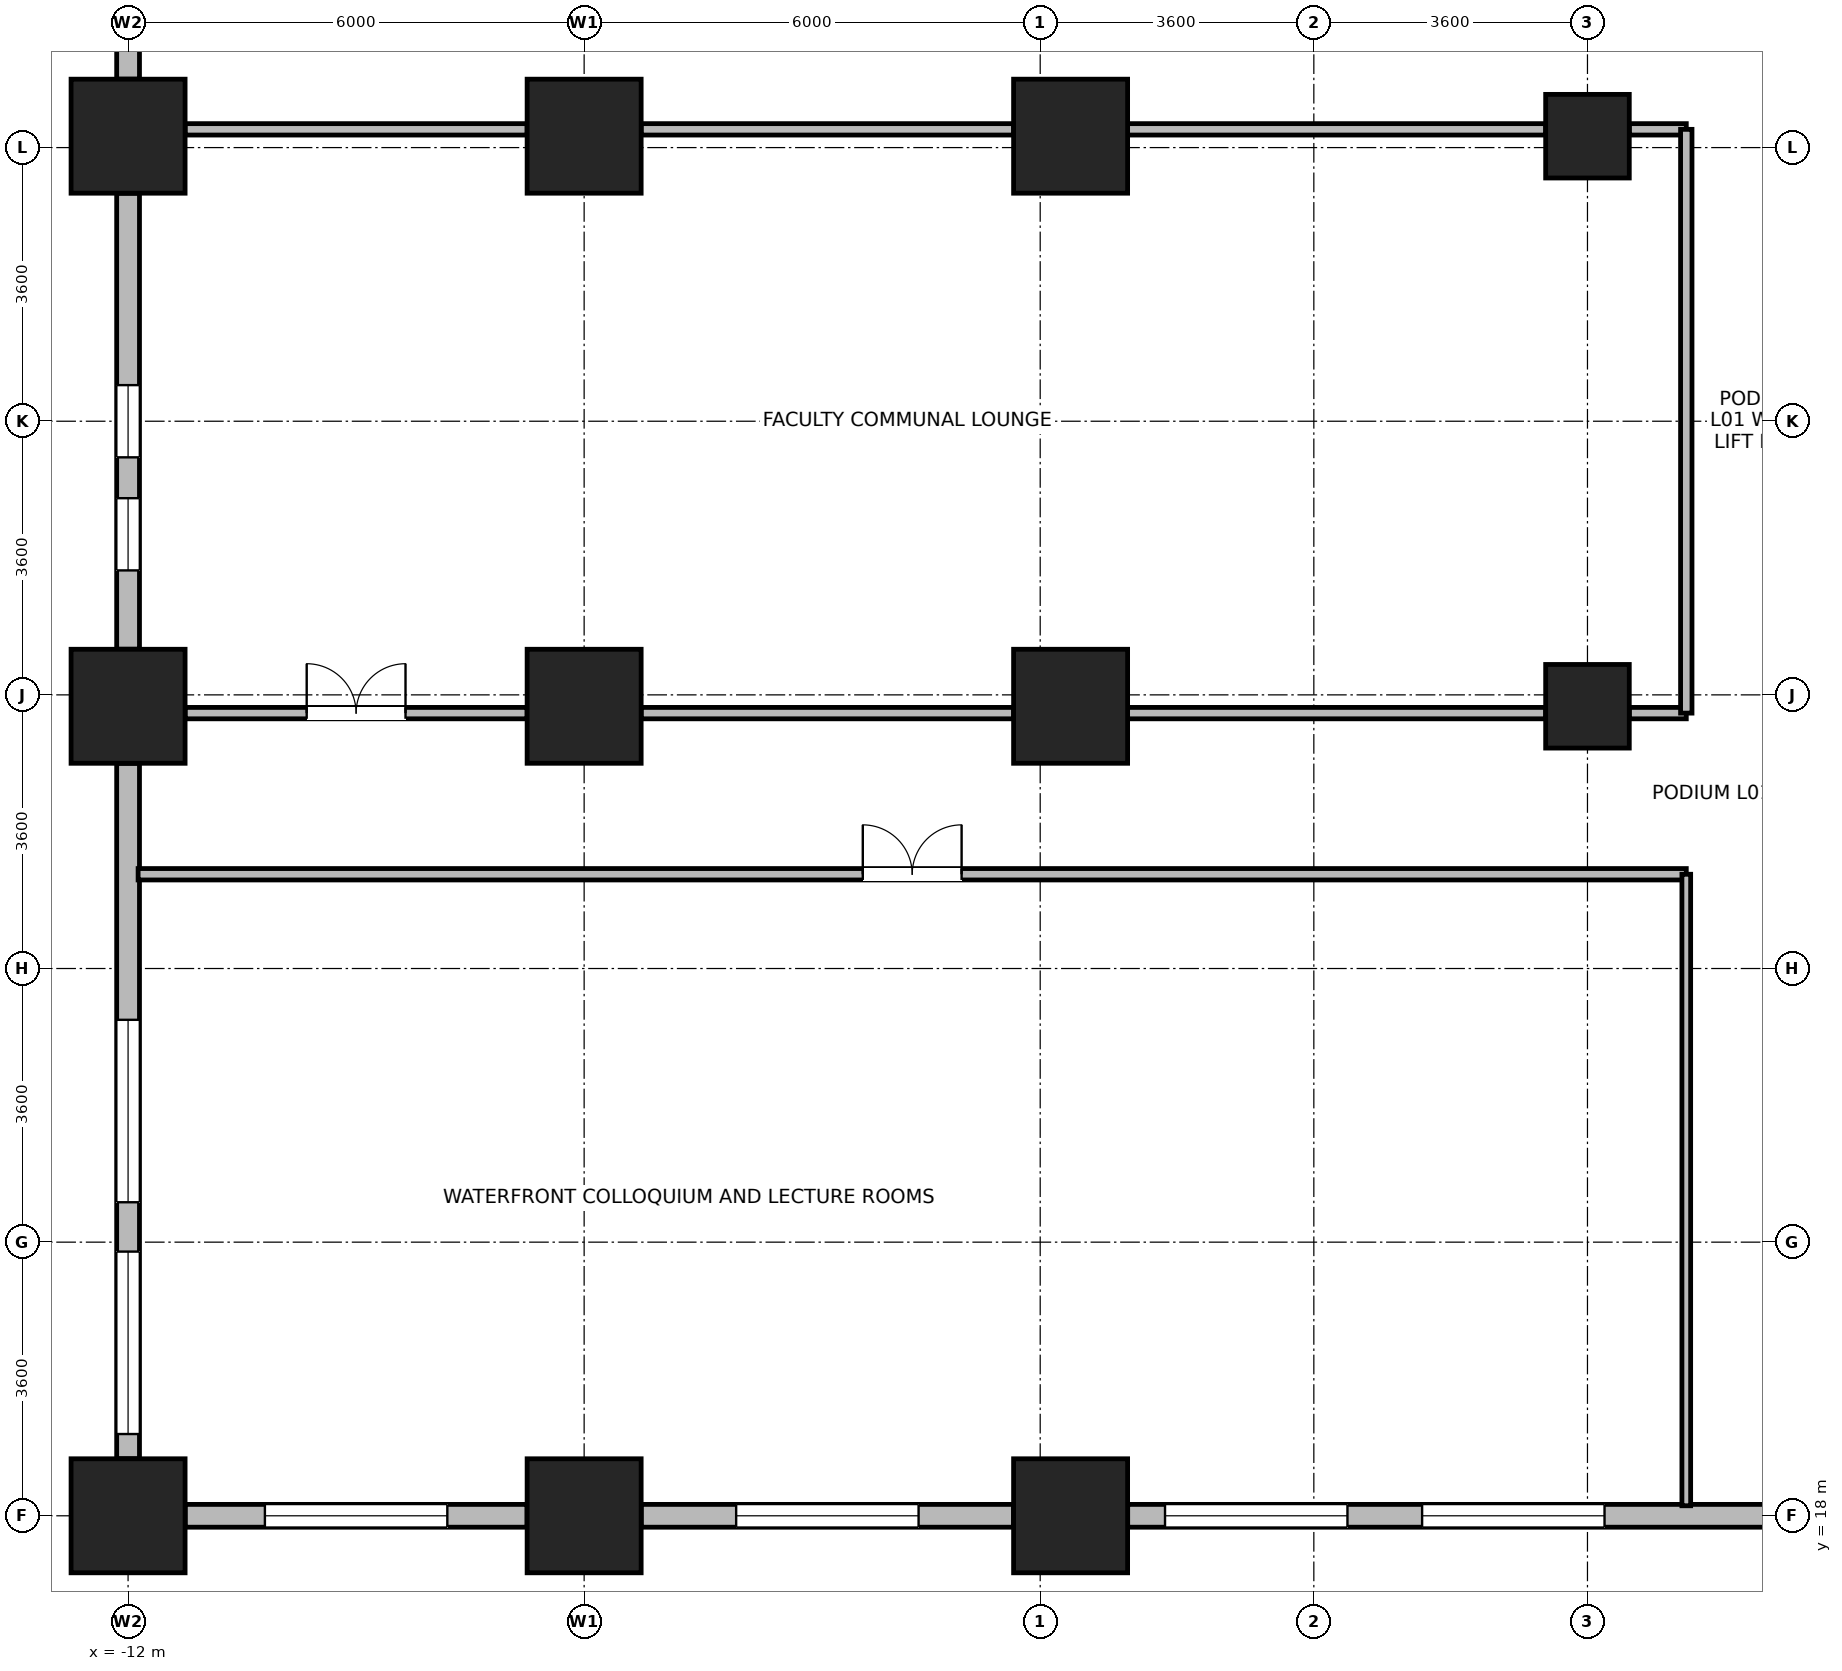
"""IFC4 building model, lengths in metres.
Left out: names, types, materials, properties, quantities, classifications, styles, units other than length and angle.
Written with IfcOpenShell. Run it as: python <this file> out.ifc"""

import sys

from ifc_helpers import new_model, si_unit, direction, frame, frame_2d, origin, origin_2d, place, context, subcontext, project, spatial, rectangle, circle, extrude, source, transform, mapped, element, fill, save


model = new_model("IFC4")
c1 = context("Model", 3, precision=1e-05, world=origin(), true_north=direction((0.0, 1.0)))
c2 = subcontext(c1, "Body", "Model", "MODEL_VIEW")
j1 = project(units=[si_unit("LENGTHUNIT", "METRE"), si_unit("PLANEANGLEUNIT", "RADIAN")], contexts=[c1])
p1 = place(None, origin())
s1 = spatial("IfcSite", under=j1, at=p1, CompositionType="ELEMENT")
p2 = place(p1, origin())
s2 = spatial("IfcBuilding", under=s1, at=p2, CompositionType="ELEMENT")
p3 = place(p2, frame((0.0, 0.0, 5.4)))
s3 = spatial("IfcBuildingStorey", under=s2, at=p3, CompositionType="ELEMENT", Elevation=5.4)
m1 = source(origin(), c2, "Body", "SweptSolid", [
    extrude(circle(Radius=0.55, at=origin_2d()), origin(), (0.0, 0.0, 1.0), 4.8),
])
for number, where, z_axis, x_axis in (
    (1, (7.2, 28.65, 0.0), (0.0, 0.0, 1.0), (1.0, 0.0, 0.0)),
    (2, (7.2, 36.15, 0.0), (0.0, 0.0, 1.0), (1.0, 0.0, 0.0)),
):
    element("IfcColumn", number, at=place(p3, frame(where, z_axis=z_axis, x_axis=x_axis)), inside=s3, PredefinedType="COLUMN", context=c2, shape_type="MappedRepresentation", body=[
        mapped(m1, transform((0.0, 0.0, 0.0), x_axis=(1.0, 0.0, 0.0), y_axis=(0.0, 1.0, 0.0), z_axis=(0.0, 0.0, 1.0), scale=1.0)),
    ])
m2 = source(origin(), c2, "Body", "SweptSolid", [
    extrude(rectangle(XDim=1.5, YDim=1.5, at=origin_2d()), origin(), (0.0, 0.0, 1.0), 4.8),
])
for number, where, z_axis, x_axis in (
    (3, (0.4, 18.0, 0.0), (0.0, 0.0, 1.0), (1.0, 0.0, 0.0)),
    (4, (0.4, 28.65, 0.0), (0.0, 0.0, 1.0), (1.0, 0.0, 0.0)),
    (5, (0.4, 36.15, 0.0), (0.0, 0.0, 1.0), (1.0, 0.0, 0.0)),
    (6, (-12.0, 18.0, 0.0), (0.0, 0.0, 1.0), (1.0, 0.0, 0.0)),
    (7, (-12.0, 28.65, 0.0), (0.0, 0.0, 1.0), (1.0, 0.0, 0.0)),
    (8, (-12.0, 36.15, 0.0), (0.0, 0.0, 1.0), (1.0, 0.0, 0.0)),
    (9, (-6.0, 18.0, 0.0), (0.0, 0.0, 1.0), (1.0, 0.0, 0.0)),
    (10, (-6.0, 28.65, 0.0), (0.0, 0.0, 1.0), (1.0, 0.0, 0.0)),
    (11, (-6.0, 36.15, 0.0), (0.0, 0.0, 1.0), (1.0, 0.0, 0.0)),
):
    element("IfcColumn", number, at=place(p3, frame(where, z_axis=z_axis, x_axis=x_axis)), inside=s3, PredefinedType="COLUMN", context=c2, shape_type="MappedRepresentation", body=[
        mapped(m2, transform((0.0, 0.0, 0.0), x_axis=(1.0, 0.0, 0.0), y_axis=(0.0, 1.0, 0.0), z_axis=(0.0, 0.0, 1.0), scale=1.0)),
    ])
p4 = place(p3, frame((-12.0, 36.901, 0.0), z_axis=(0.0, 0.0, 1.0), x_axis=(0.0, 1.0, 0.0)))
e12 = element("IfcWall", 12, at=p4, inside=s3, PredefinedType="STANDARD", context=c2, shape_type="SweptSolid", body=[
    extrude(rectangle(XDim=7.198, YDim=0.3, at=frame_2d((3.599, 0.0))), origin(), (0.0, 0.0, 1.0), 3.9),
])
p5 = place(p4, frame((4.198, 0.0, 0.9)))
e13 = element("IfcOpeningElement", 13, at=p5, cuts=e12, PredefinedType="OPENING", context=c2, shape_type="SweptSolid", body=[
    extrude(rectangle(XDim=2.4, YDim=2.5, at=frame_2d((1.2, 1.25))), frame((0.0, 0.16, 0.0), z_axis=(0.0, -1.0, 0.0), x_axis=(1.0, 0.0, 0.0)), (0.0, 0.0, 1.0), 0.32),
])
p6 = place(p4, frame((2.548, 0.0, 0.9)))
e14 = element("IfcOpeningElement", 14, at=p6, cuts=e12, PredefinedType="OPENING", context=c2, shape_type="SweptSolid", body=[
    extrude(rectangle(XDim=0.95, YDim=1.75, at=frame_2d((0.475, 0.875))), frame((0.0, 0.16, 0.0), z_axis=(0.0, -1.0, 0.0), x_axis=(1.0, 0.0, 0.0)), (0.0, 0.0, 1.0), 0.32),
])
p7 = place(p3, frame((-12.0, 29.401, 0.0), z_axis=(0.0, 0.0, 1.0), x_axis=(0.0, 1.0, 0.0)))
e15 = element("IfcWall", 15, at=p7, inside=s3, PredefinedType="STANDARD", context=c2, shape_type="SweptSolid", body=[
    extrude(rectangle(XDim=5.998, YDim=0.3, at=frame_2d((2.999, 0.0))), origin(), (0.0, 0.0, 1.0), 3.9),
])
p8 = place(p7, frame((2.524, 0.0, 0.9)))
e16 = element("IfcOpeningElement", 16, at=p8, cuts=e15, PredefinedType="OPENING", context=c2, shape_type="SweptSolid", body=[
    extrude(rectangle(XDim=0.95, YDim=1.75, at=frame_2d((0.475, 0.875))), frame((0.0, 0.16, 0.0), z_axis=(0.0, -1.0, 0.0), x_axis=(1.0, 0.0, 0.0)), (0.0, 0.0, 1.0), 0.32),
])
p9 = place(p7, frame((1.037, 0.0, 0.9)))
e17 = element("IfcOpeningElement", 17, at=p9, cuts=e15, PredefinedType="OPENING", context=c2, shape_type="SweptSolid", body=[
    extrude(rectangle(XDim=0.95, YDim=1.75, at=frame_2d((0.475, 0.875))), frame((0.0, 0.16, 0.0), z_axis=(0.0, -1.0, 0.0), x_axis=(1.0, 0.0, 0.0)), (0.0, 0.0, 1.0), 0.32),
])
p10 = place(p3, frame((-12.0, 18.751, 0.0), z_axis=(0.0, 0.0, 1.0), x_axis=(0.0, 1.0, 0.0)))
e18 = element("IfcWall", 18, at=p10, inside=s3, PredefinedType="STANDARD", context=c2, shape_type="SweptSolid", body=[
    extrude(rectangle(XDim=9.148, YDim=0.3, at=frame_2d((4.574, 0.0))), origin(), (0.0, 0.0, 1.0), 3.9),
])
p11 = place(p10, frame((0.325, 0.0, 0.9)))
e19 = element("IfcOpeningElement", 19, at=p11, cuts=e18, PredefinedType="OPENING", context=c2, shape_type="SweptSolid", body=[
    extrude(rectangle(XDim=2.4, YDim=2.5, at=frame_2d((1.2, 1.25))), frame((0.0, 0.16, 0.0), z_axis=(0.0, -1.0, 0.0), x_axis=(1.0, 0.0, 0.0)), (0.0, 0.0, 1.0), 0.32),
])
p12 = place(p10, frame((3.374, 0.0, 0.9)))
e20 = element("IfcOpeningElement", 20, at=p12, cuts=e18, PredefinedType="OPENING", context=c2, shape_type="SweptSolid", body=[
    extrude(rectangle(XDim=2.4, YDim=2.5, at=frame_2d((1.2, 1.25))), frame((0.0, 0.16, 0.0), z_axis=(0.0, -1.0, 0.0), x_axis=(1.0, 0.0, 0.0)), (0.0, 0.0, 1.0), 0.32),
])
p13 = place(p3, frame((-6.751, 18.0, 0.0), z_axis=(0.0, 0.0, 1.0), x_axis=(-1.0, 0.0, 0.0)))
e21 = element("IfcWall", 21, at=p13, inside=s3, PredefinedType="STANDARD", context=c2, shape_type="SweptSolid", body=[
    extrude(rectangle(XDim=4.498, YDim=0.3, at=frame_2d((2.249, 0.0))), origin(), (0.0, 0.0, 1.0), 3.8),
])
p14 = place(p13, frame((1.049, 0.0, 0.9)))
e22 = element("IfcOpeningElement", 22, at=p14, cuts=e21, PredefinedType="OPENING", context=c2, shape_type="SweptSolid", body=[
    extrude(rectangle(XDim=2.4, YDim=2.5, at=frame_2d((1.2, 1.25))), frame((0.0, 0.16, 0.0), z_axis=(0.0, -1.0, 0.0), x_axis=(1.0, 0.0, 0.0)), (0.0, 0.0, 1.0), 0.32),
])
p15 = place(p3, frame((-0.351, 18.0, 0.0), z_axis=(0.0, 0.0, 1.0), x_axis=(-1.0, 0.0, 0.0)))
e23 = element("IfcWall", 23, at=p15, inside=s3, PredefinedType="STANDARD", context=c2, shape_type="SweptSolid", body=[
    extrude(rectangle(XDim=4.898, YDim=0.3, at=frame_2d((2.449, 0.0))), origin(), (0.0, 0.0, 1.0), 3.8),
])
p16 = place(p15, frame((1.249, 0.0, 0.9)))
e24 = element("IfcOpeningElement", 24, at=p16, cuts=e23, PredefinedType="OPENING", context=c2, shape_type="SweptSolid", body=[
    extrude(rectangle(XDim=2.4, YDim=2.5, at=frame_2d((1.2, 1.25))), frame((0.0, 0.16, 0.0), z_axis=(0.0, -1.0, 0.0), x_axis=(1.0, 0.0, 0.0)), (0.0, 0.0, 1.0), 0.32),
])
p17 = place(p3, frame((21.445, 18.0, 0.0), z_axis=(0.0, 0.0, 1.0), x_axis=(-1.0, 0.0, 0.0)))
e25 = element("IfcWall", 25, at=p17, inside=s3, PredefinedType="STANDARD", context=c2, shape_type="SweptSolid", body=[
    extrude(rectangle(XDim=20.294, YDim=0.3, at=frame_2d((10.147, 0.0))), origin(), (0.0, 0.0, 1.0), 4.5),
])
p18 = place(p17, frame((0.491, 0.0, 0.9)))
e26 = element("IfcOpeningElement", 26, at=p18, cuts=e25, PredefinedType="OPENING", context=c2, shape_type="SweptSolid", body=[
    extrude(rectangle(XDim=2.4, YDim=2.5, at=frame_2d((1.2, 1.25))), frame((0.0, 0.16, 0.0), z_axis=(0.0, -1.0, 0.0), x_axis=(1.0, 0.0, 0.0)), (0.0, 0.0, 1.0), 0.32),
])
p19 = place(p17, frame((3.874, 0.0, 0.9)))
e27 = element("IfcOpeningElement", 27, at=p19, cuts=e25, PredefinedType="OPENING", context=c2, shape_type="SweptSolid", body=[
    extrude(rectangle(XDim=2.4, YDim=2.5, at=frame_2d((1.2, 1.25))), frame((0.0, 0.16, 0.0), z_axis=(0.0, -1.0, 0.0), x_axis=(1.0, 0.0, 0.0)), (0.0, 0.0, 1.0), 0.32),
])
p20 = place(p17, frame((7.256, 0.0, 0.9)))
e28 = element("IfcOpeningElement", 28, at=p20, cuts=e25, PredefinedType="OPENING", context=c2, shape_type="SweptSolid", body=[
    extrude(rectangle(XDim=2.4, YDim=2.5, at=frame_2d((1.2, 1.25))), frame((0.0, 0.16, 0.0), z_axis=(0.0, -1.0, 0.0), x_axis=(1.0, 0.0, 0.0)), (0.0, 0.0, 1.0), 0.32),
])
p21 = place(p17, frame((14.021, 0.0, 0.9)))
e29 = element("IfcOpeningElement", 29, at=p21, cuts=e25, PredefinedType="OPENING", context=c2, shape_type="SweptSolid", body=[
    extrude(rectangle(XDim=2.4, YDim=2.5, at=frame_2d((1.2, 1.25))), frame((0.0, 0.16, 0.0), z_axis=(0.0, -1.0, 0.0), x_axis=(1.0, 0.0, 0.0)), (0.0, 0.0, 1.0), 0.32),
])
p22 = place(p17, frame((17.403, 0.0, 0.9)))
e30 = element("IfcOpeningElement", 30, at=p22, cuts=e25, PredefinedType="OPENING", context=c2, shape_type="SweptSolid", body=[
    extrude(rectangle(XDim=2.4, YDim=2.5, at=frame_2d((1.2, 1.25))), frame((0.0, 0.16, 0.0), z_axis=(0.0, -1.0, 0.0), x_axis=(1.0, 0.0, 0.0)), (0.0, 0.0, 1.0), 0.32),
])
p23 = place(p3, frame((-11.868, 26.44, 0.0), z_axis=(0.0, 0.0, 1.0), x_axis=(1.0, 0.0, 0.0)))
e31 = element("IfcWall", 31, at=p23, inside=s3, PredefinedType="PARTITIONING", context=c2, shape_type="SweptSolid", body=[
    extrude(rectangle(XDim=20.368, YDim=0.15, at=frame_2d((10.184, 0.0))), origin(), (0.0, 0.0, 1.0), 4.5),
])
p24 = place(p23, frame((9.534, 0.0, 0.0)))
e32 = element("IfcOpeningElement", 32, at=p24, cuts=e31, PredefinedType="OPENING", context=c2, shape_type="SweptSolid", body=[
    extrude(rectangle(XDim=1.3, YDim=2.12, at=frame_2d((0.65, 1.06))), frame((0.0, 0.085, 0.0), z_axis=(0.0, -1.0, 0.0), x_axis=(1.0, 0.0, 0.0)), (0.0, 0.0, 1.0), 0.17),
])
p25 = place(p3, frame((-11.25, 28.56, 0.0), z_axis=(0.0, 0.0, 1.0), x_axis=(1.0, 0.0, 0.0)))
e33 = element("IfcWall", 33, at=p25, inside=s3, PredefinedType="PARTITIONING", context=c2, shape_type="SweptSolid", body=[
    extrude(rectangle(XDim=4.5, YDim=0.15, at=frame_2d((2.25, 0.0))), origin(), (0.0, 0.0, 1.0), 3.8),
])
p26 = place(p25, frame((1.6, 0.0, 0.0)))
e34 = element("IfcOpeningElement", 34, at=p26, cuts=e33, PredefinedType="OPENING", context=c2, shape_type="SweptSolid", body=[
    extrude(rectangle(XDim=1.3, YDim=2.12, at=frame_2d((0.65, 1.06))), frame((0.0, 0.085, 0.0), z_axis=(0.0, -1.0, 0.0), x_axis=(1.0, 0.0, 0.0)), (0.0, 0.0, 1.0), 0.17),
])
p27 = place(p3, frame((-5.25, 28.56, 0.0), z_axis=(0.0, 0.0, 1.0), x_axis=(1.0, 0.0, 0.0)))
e35 = element("IfcWall", 35, at=p27, inside=s3, PredefinedType="PARTITIONING", context=c2, shape_type="SweptSolid", body=[
    extrude(rectangle(XDim=4.9, YDim=0.15, at=frame_2d((2.45, 0.0))), origin(), (0.0, 0.0, 1.0), 3.8),
])
p28 = place(p3, frame((1.15, 28.56, 0.0), z_axis=(0.0, 0.0, 1.0), x_axis=(1.0, 0.0, 0.0)))
e36 = element("IfcWall", 36, at=p28, inside=s3, PredefinedType="PARTITIONING", context=c2, shape_type="SweptSolid", body=[
    extrude(rectangle(XDim=5.5, YDim=0.15, at=frame_2d((2.75, 0.0))), origin(), (0.0, 0.0, 1.0), 3.8),
])
p29 = place(p3, frame((7.75, 28.56, 0.0), z_axis=(0.0, 0.0, 1.0), x_axis=(1.0, 0.0, 0.0)))
e37 = element("IfcWall", 37, at=p29, inside=s3, PredefinedType="PARTITIONING", context=c2, shape_type="SweptSolid", body=[
    extrude(rectangle(XDim=0.75, YDim=0.15, at=frame_2d((0.375, 0.0))), origin(), (0.0, 0.0, 1.0), 3.8),
])
p30 = place(p3, frame((-11.25, 36.24, 0.0), z_axis=(0.0, 0.0, 1.0), x_axis=(1.0, 0.0, 0.0)))
e38 = element("IfcWall", 38, at=p30, inside=s3, PredefinedType="PARTITIONING", context=c2, shape_type="SweptSolid", body=[
    extrude(rectangle(XDim=4.5, YDim=0.15, at=frame_2d((2.25, 0.0))), origin(), (0.0, 0.0, 1.0), 3.8),
])
p31 = place(p3, frame((-5.25, 36.24, 0.0), z_axis=(0.0, 0.0, 1.0), x_axis=(1.0, 0.0, 0.0)))
e39 = element("IfcWall", 39, at=p31, inside=s3, PredefinedType="PARTITIONING", context=c2, shape_type="SweptSolid", body=[
    extrude(rectangle(XDim=4.9, YDim=0.15, at=frame_2d((2.45, 0.0))), origin(), (0.0, 0.0, 1.0), 3.8),
])
p32 = place(p3, frame((1.15, 36.24, 0.0), z_axis=(0.0, 0.0, 1.0), x_axis=(1.0, 0.0, 0.0)))
e40 = element("IfcWall", 40, at=p32, inside=s3, PredefinedType="PARTITIONING", context=c2, shape_type="SweptSolid", body=[
    extrude(rectangle(XDim=5.5, YDim=0.15, at=frame_2d((2.75, 0.0))), origin(), (0.0, 0.0, 1.0), 3.8),
])
p33 = place(p3, frame((7.75, 36.24, 0.0), z_axis=(0.0, 0.0, 1.0), x_axis=(1.0, 0.0, 0.0)))
e41 = element("IfcWall", 41, at=p33, inside=s3, PredefinedType="PARTITIONING", context=c2, shape_type="SweptSolid", body=[
    extrude(rectangle(XDim=0.75, YDim=0.15, at=frame_2d((0.375, 0.0))), origin(), (0.0, 0.0, 1.0), 3.8),
])
p34 = place(p3, frame((8.5, 28.56, 0.0), z_axis=(0.0, 0.0, 1.0), x_axis=(0.0, 1.0, 0.0)))
e42 = element("IfcWall", 42, at=p34, inside=s3, PredefinedType="PARTITIONING", context=c2, shape_type="SweptSolid", body=[
    extrude(rectangle(XDim=7.68, YDim=0.15, at=frame_2d((3.84, 0.0))), origin(), (0.0, 0.0, 1.0), 4.5),
])
p35 = place(p3, frame((8.5, 18.132, 0.0), z_axis=(0.0, 0.0, 1.0), x_axis=(0.0, 1.0, 0.0)))
e43 = element("IfcWall", 43, at=p35, inside=s3, PredefinedType="PARTITIONING", context=c2, shape_type="SweptSolid", body=[
    extrude(rectangle(XDim=8.308, YDim=0.115, at=frame_2d((4.154, 0.0))), origin(), (0.0, 0.0, 1.0), 4.5),
])
p36 = place(p8, origin())
e44 = element("IfcWindow", 44, at=p36, inside=s3, PartitioningType="SINGLE_PANEL", PredefinedType="WINDOW", context=c2, shape_type="SweptSolid", body=[
    extrude(rectangle(XDim=0.95, YDim=1.75, at=frame_2d((0.475, 0.875))), frame((0.0, 0.03, 0.0), z_axis=(0.0, -1.0, 0.0), x_axis=(1.0, 0.0, 0.0)), (0.0, 0.0, 1.0), 0.06),
])
fill(e16, e44)
p37 = place(p9, origin())
e45 = element("IfcWindow", 45, at=p37, inside=s3, PartitioningType="SINGLE_PANEL", PredefinedType="WINDOW", context=c2, shape_type="SweptSolid", body=[
    extrude(rectangle(XDim=0.95, YDim=1.75, at=frame_2d((0.475, 0.875))), frame((0.0, 0.03, 0.0), z_axis=(0.0, -1.0, 0.0), x_axis=(1.0, 0.0, 0.0)), (0.0, 0.0, 1.0), 0.06),
])
fill(e17, e45)
p38 = place(p11, origin())
e46 = element("IfcWindow", 46, at=p38, inside=s3, PartitioningType="SINGLE_PANEL", PredefinedType="WINDOW", context=c2, shape_type="SweptSolid", body=[
    extrude(rectangle(XDim=2.4, YDim=2.5, at=frame_2d((1.2, 1.25))), frame((0.0, 0.03, 0.0), z_axis=(0.0, -1.0, 0.0), x_axis=(1.0, 0.0, 0.0)), (0.0, 0.0, 1.0), 0.06),
])
fill(e19, e46)
p39 = place(p12, origin())
e47 = element("IfcWindow", 47, at=p39, inside=s3, PartitioningType="SINGLE_PANEL", PredefinedType="WINDOW", context=c2, shape_type="SweptSolid", body=[
    extrude(rectangle(XDim=2.4, YDim=2.5, at=frame_2d((1.2, 1.25))), frame((0.0, 0.03, 0.0), z_axis=(0.0, -1.0, 0.0), x_axis=(1.0, 0.0, 0.0)), (0.0, 0.0, 1.0), 0.06),
])
fill(e20, e47)
p40 = place(p14, origin())
e48 = element("IfcWindow", 48, at=p40, inside=s3, PartitioningType="SINGLE_PANEL", PredefinedType="WINDOW", context=c2, shape_type="SweptSolid", body=[
    extrude(rectangle(XDim=2.4, YDim=2.5, at=frame_2d((1.2, 1.25))), frame((0.0, 0.03, 0.0), z_axis=(0.0, -1.0, 0.0), x_axis=(1.0, 0.0, 0.0)), (0.0, 0.0, 1.0), 0.06),
])
fill(e22, e48)
p41 = place(p16, origin())
e49 = element("IfcWindow", 49, at=p41, inside=s3, PartitioningType="SINGLE_PANEL", PredefinedType="WINDOW", context=c2, shape_type="SweptSolid", body=[
    extrude(rectangle(XDim=2.4, YDim=2.5, at=frame_2d((1.2, 1.25))), frame((0.0, 0.03, 0.0), z_axis=(0.0, -1.0, 0.0), x_axis=(1.0, 0.0, 0.0)), (0.0, 0.0, 1.0), 0.06),
])
fill(e24, e49)
p42 = place(p21, origin())
e50 = element("IfcWindow", 50, at=p42, inside=s3, PartitioningType="SINGLE_PANEL", PredefinedType="WINDOW", context=c2, shape_type="SweptSolid", body=[
    extrude(rectangle(XDim=2.4, YDim=2.5, at=frame_2d((1.2, 1.25))), frame((0.0, 0.03, 0.0), z_axis=(0.0, -1.0, 0.0), x_axis=(1.0, 0.0, 0.0)), (0.0, 0.0, 1.0), 0.06),
])
fill(e29, e50)
p43 = place(p22, origin())
e51 = element("IfcWindow", 51, at=p43, inside=s3, PartitioningType="SINGLE_PANEL", PredefinedType="WINDOW", context=c2, shape_type="SweptSolid", body=[
    extrude(rectangle(XDim=2.4, YDim=2.5, at=frame_2d((1.2, 1.25))), frame((0.0, 0.03, 0.0), z_axis=(0.0, -1.0, 0.0), x_axis=(1.0, 0.0, 0.0)), (0.0, 0.0, 1.0), 0.06),
])
fill(e30, e51)
p44 = place(p24, origin())
e52 = element("IfcDoor", 52, at=p44, inside=s3, OperationType="DOUBLE_DOOR_SINGLE_SWING", PredefinedType="DOOR", context=c2, shape_type="SweptSolid", body=[
    extrude(rectangle(XDim=1.3, YDim=2.12, at=frame_2d((0.65, 1.06))), frame((0.0, 0.025, 0.0), z_axis=(0.0, -1.0, 0.0), x_axis=(1.0, 0.0, 0.0)), (0.0, 0.0, 1.0), 0.05),
])
fill(e32, e52)
p45 = place(p26, origin())
e53 = element("IfcDoor", 53, at=p45, inside=s3, OperationType="DOUBLE_DOOR_SINGLE_SWING", PredefinedType="DOOR", context=c2, shape_type="SweptSolid", body=[
    extrude(rectangle(XDim=1.3, YDim=2.12, at=frame_2d((0.65, 1.06))), frame((0.0, 0.025, 0.0), z_axis=(0.0, -1.0, 0.0), x_axis=(1.0, 0.0, 0.0)), (0.0, 0.0, 1.0), 0.05),
])
fill(e34, e53)
save(model, sys.argv[1])
